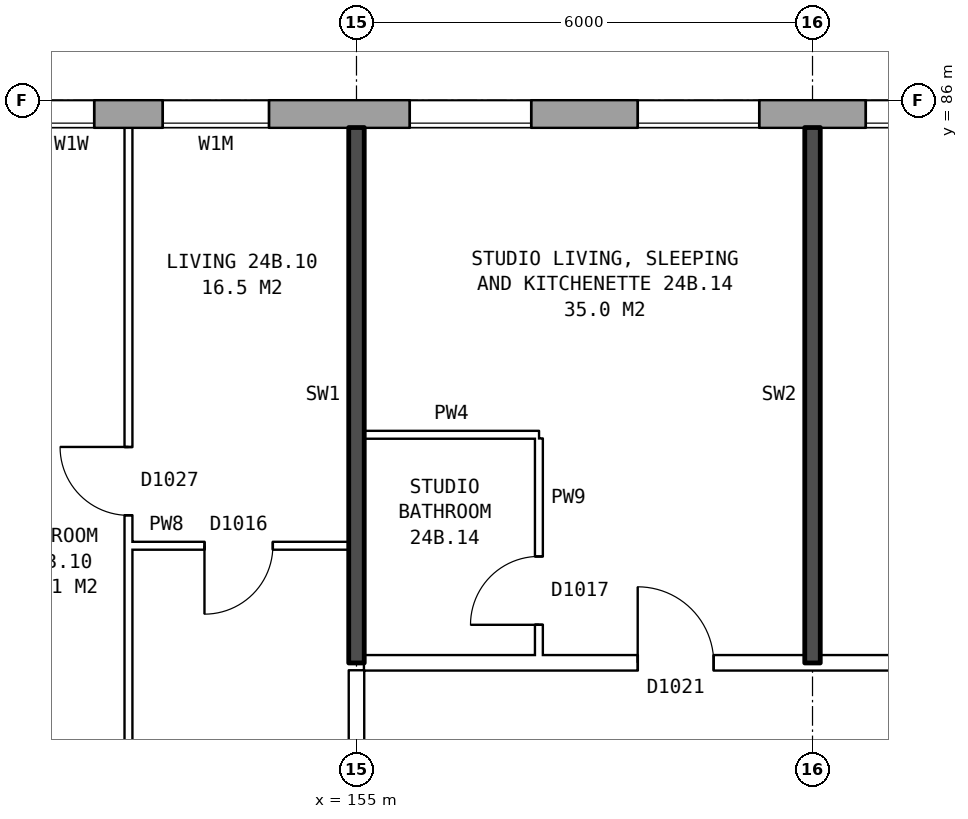
"""IFC4 building model, lengths in metres.
Left out: names, types, materials, properties, quantities, classifications, styles, units other than length and angle.
Written with IfcOpenShell. Run it as: python <this file> out.ifc"""

import sys

from ifc_helpers import new_model, si_unit, direction, frame, frame_2d, origin, place, context, subcontext, project, spatial, rectangle, extrude, element, fill, save


model = new_model("IFC4")
c1 = context("Model", 3, precision=1e-05, world=origin(), true_north=direction((0.0, 1.0)))
c2 = subcontext(c1, "Body", "Model", "MODEL_VIEW")
j1 = project(units=[si_unit("LENGTHUNIT", "METRE"), si_unit("PLANEANGLEUNIT", "RADIAN")], contexts=[c1])
p1 = place(None, origin())
s1 = spatial("IfcSite", under=j1, at=p1, CompositionType="ELEMENT")
p2 = place(p1, origin())
s2 = spatial("IfcBuilding", under=s1, at=p2, CompositionType="ELEMENT")
p3 = place(p2, frame((0.0, 0.0, 87.1)))
s3 = spatial("IfcBuildingStorey", under=s2, at=p3, CompositionType="ELEMENT", Elevation=87.1)
p4 = place(p3, frame((172.175, 85.82, 0.0), z_axis=(0.0, 0.0, 1.0), x_axis=(-1.0, 0.0, 0.0)))
e1 = element("IfcWall", 1, at=p4, inside=s3, PredefinedType="STANDARD", context=c2, shape_type="SweptSolid", body=[
    extrude(rectangle(XDim=38.101, YDim=0.36, at=frame_2d((19.05, 0.0))), origin(), (0.0, 0.0, 1.0), 2.85),
])
p5 = place(p4, frame((2.875, 0.0, 0.8)))
e2 = element("IfcOpeningElement", 2, at=p5, cuts=e1, PredefinedType="OPENING", context=c2, shape_type="SweptSolid", body=[
    extrude(rectangle(XDim=1.6, YDim=1.8, at=frame_2d((0.8, 0.9))), frame((0.0, 0.19, 0.0), z_axis=(0.0, -1.0, 0.0), x_axis=(1.0, 0.0, 0.0)), (0.0, 0.0, 1.0), 0.38),
])
p6 = place(p4, frame((5.875, 0.0, 0.8)))
e3 = element("IfcOpeningElement", 3, at=p6, cuts=e1, PredefinedType="OPENING", context=c2, shape_type="SweptSolid", body=[
    extrude(rectangle(XDim=1.6, YDim=1.8, at=frame_2d((0.8, 0.9))), frame((0.0, 0.19, 0.0), z_axis=(0.0, -1.0, 0.0), x_axis=(1.0, 0.0, 0.0)), (0.0, 0.0, 1.0), 0.38),
])
p7 = place(p4, frame((8.875, 0.0, 0.8)))
e4 = element("IfcOpeningElement", 4, at=p7, cuts=e1, PredefinedType="OPENING", context=c2, shape_type="SweptSolid", body=[
    extrude(rectangle(XDim=1.6, YDim=1.8, at=frame_2d((0.8, 0.9))), frame((0.0, 0.19, 0.0), z_axis=(0.0, -1.0, 0.0), x_axis=(1.0, 0.0, 0.0)), (0.0, 0.0, 1.0), 0.38),
])
p8 = place(p4, frame((11.875, 0.0, 0.8)))
e5 = element("IfcOpeningElement", 5, at=p8, cuts=e1, PredefinedType="OPENING", context=c2, shape_type="SweptSolid", body=[
    extrude(rectangle(XDim=1.6, YDim=1.8, at=frame_2d((0.8, 0.9))), frame((0.0, 0.19, 0.0), z_axis=(0.0, -1.0, 0.0), x_axis=(1.0, 0.0, 0.0)), (0.0, 0.0, 1.0), 0.38),
])
p9 = place(p4, frame((14.875, 0.0, 0.8)))
e6 = element("IfcOpeningElement", 6, at=p9, cuts=e1, PredefinedType="OPENING", context=c2, shape_type="SweptSolid", body=[
    extrude(rectangle(XDim=1.6, YDim=1.8, at=frame_2d((0.8, 0.9))), frame((0.0, 0.19, 0.0), z_axis=(0.0, -1.0, 0.0), x_axis=(1.0, 0.0, 0.0)), (0.0, 0.0, 1.0), 0.38),
])
p10 = place(p4, frame((18.325, 0.0, 0.15)))
e7 = element("IfcOpeningElement", 7, at=p10, cuts=e1, PredefinedType="OPENING", context=c2, shape_type="SweptSolid", body=[
    extrude(rectangle(XDim=1.4, YDim=1.2, at=frame_2d((0.7, 0.6))), frame((0.0, 0.19, 0.0), z_axis=(0.0, -1.0, 0.0), x_axis=(1.0, 0.0, 0.0)), (0.0, 0.0, 1.0), 0.38),
])
p11 = place(p4, frame((20.625, 0.0, 1.7)))
e8 = element("IfcOpeningElement", 8, at=p11, cuts=e1, PredefinedType="OPENING", context=c2, shape_type="SweptSolid", body=[
    extrude(rectangle(XDim=0.6, YDim=0.9, at=frame_2d((0.3, 0.45))), frame((0.0, 0.19, 0.0), z_axis=(0.0, -1.0, 0.0), x_axis=(1.0, 0.0, 0.0)), (0.0, 0.0, 1.0), 0.38),
])
p12 = place(p4, frame((23.875, 0.0, 0.8)))
e9 = element("IfcOpeningElement", 9, at=p12, cuts=e1, PredefinedType="OPENING", context=c2, shape_type="SweptSolid", body=[
    extrude(rectangle(XDim=1.6, YDim=1.8, at=frame_2d((0.8, 0.9))), frame((0.0, 0.19, 0.0), z_axis=(0.0, -1.0, 0.0), x_axis=(1.0, 0.0, 0.0)), (0.0, 0.0, 1.0), 0.38),
])
p13 = place(p4, frame((26.875, 0.0, 0.8)))
e10 = element("IfcOpeningElement", 10, at=p13, cuts=e1, PredefinedType="OPENING", context=c2, shape_type="SweptSolid", body=[
    extrude(rectangle(XDim=1.6, YDim=1.8, at=frame_2d((0.8, 0.9))), frame((0.0, 0.19, 0.0), z_axis=(0.0, -1.0, 0.0), x_axis=(1.0, 0.0, 0.0)), (0.0, 0.0, 1.0), 0.38),
])
p14 = place(p4, frame((29.875, 0.0, 0.8)))
e11 = element("IfcOpeningElement", 11, at=p14, cuts=e1, PredefinedType="OPENING", context=c2, shape_type="SweptSolid", body=[
    extrude(rectangle(XDim=1.6, YDim=1.8, at=frame_2d((0.8, 0.9))), frame((0.0, 0.19, 0.0), z_axis=(0.0, -1.0, 0.0), x_axis=(1.0, 0.0, 0.0)), (0.0, 0.0, 1.0), 0.38),
])
p15 = place(p4, frame((32.875, 0.0, 0.8)))
e12 = element("IfcOpeningElement", 12, at=p15, cuts=e1, PredefinedType="OPENING", context=c2, shape_type="SweptSolid", body=[
    extrude(rectangle(XDim=1.6, YDim=1.8, at=frame_2d((0.8, 0.9))), frame((0.0, 0.19, 0.0), z_axis=(0.0, -1.0, 0.0), x_axis=(1.0, 0.0, 0.0)), (0.0, 0.0, 1.0), 0.38),
])
p16 = place(p4, frame((35.875, 0.0, 0.8)))
e13 = element("IfcOpeningElement", 13, at=p16, cuts=e1, PredefinedType="OPENING", context=c2, shape_type="SweptSolid", body=[
    extrude(rectangle(XDim=1.6, YDim=1.8, at=frame_2d((0.8, 0.9))), frame((0.0, 0.19, 0.0), z_axis=(0.0, -1.0, 0.0), x_axis=(1.0, 0.0, 0.0)), (0.0, 0.0, 1.0), 0.38),
])
p17 = place(p4, frame((21.525, 0.0, 0.8)))
e14 = element("IfcOpeningElement", 14, at=p17, cuts=e1, PredefinedType="OPENING", context=c2, shape_type="SweptSolid", body=[
    extrude(rectangle(XDim=1.4, YDim=1.8, at=frame_2d((0.7, 0.9))), frame((0.0, 0.19, 0.0), z_axis=(0.0, -1.0, 0.0), x_axis=(1.0, 0.0, 0.0)), (0.0, 0.0, 1.0), 0.38),
])
p18 = place(p3, frame((155.1, 78.6, 0.0), z_axis=(0.0, 0.0, 1.0), x_axis=(1.0, 0.0, 0.0)))
e15 = element("IfcWall", 15, at=p18, inside=s3, PredefinedType="PARTITIONING", context=c2, shape_type="SweptSolid", body=[
    extrude(rectangle(XDim=19.79, YDim=0.2, at=frame_2d((9.895, 0.0))), origin(), (0.0, 0.0, 1.0), 2.85),
])
p19 = place(p18, frame((3.6, 0.0, 0.0)))
e16 = element("IfcOpeningElement", 16, at=p19, cuts=e15, PredefinedType="OPENING", context=c2, shape_type="SweptSolid", body=[
    extrude(rectangle(XDim=1.0, YDim=2.1, at=frame_2d((0.5, 1.05))), frame((0.0, 0.11, 0.0), z_axis=(0.0, -1.0, 0.0), x_axis=(1.0, 0.0, 0.0)), (0.0, 0.0, 1.0), 0.22),
])
p20 = place(p18, frame((7.4, 0.0, 0.0)))
e17 = element("IfcOpeningElement", 17, at=p20, cuts=e15, PredefinedType="OPENING", context=c2, shape_type="SweptSolid", body=[
    extrude(rectangle(XDim=1.0, YDim=2.1, at=frame_2d((0.5, 1.05))), frame((0.0, 0.11, 0.0), z_axis=(0.0, -1.0, 0.0), x_axis=(1.0, 0.0, 0.0)), (0.0, 0.0, 1.0), 0.22),
])
p21 = place(p18, frame((16.545, 0.0, 0.0)))
e18 = element("IfcOpeningElement", 18, at=p21, cuts=e15, PredefinedType="OPENING", context=c2, shape_type="SweptSolid", body=[
    extrude(rectangle(XDim=1.0, YDim=2.1, at=frame_2d((0.5, 1.05))), frame((0.0, 0.11, 0.0), z_axis=(0.0, -1.0, 0.0), x_axis=(1.0, 0.0, 0.0)), (0.0, 0.0, 1.0), 0.22),
])
p22 = place(p3, frame((152.0, 80.14, 0.0), z_axis=(0.0, 0.0, 1.0), x_axis=(1.0, 0.0, 0.0)))
e19 = element("IfcWall", 19, at=p22, inside=s3, PredefinedType="PARTITIONING", context=c2, shape_type="SweptSolid", body=[
    extrude(rectangle(XDim=2.9, YDim=0.1, at=frame_2d((1.45, 0.0))), origin(), (0.0, 0.0, 1.0), 2.85),
])
p23 = place(p22, frame((1.0, 0.0, 0.0)))
e20 = element("IfcOpeningElement", 20, at=p23, cuts=e19, PredefinedType="OPENING", context=c2, shape_type="SweptSolid", body=[
    extrude(rectangle(XDim=0.9, YDim=2.1, at=frame_2d((0.45, 1.05))), frame((0.0, 0.06, 0.0), z_axis=(0.0, -1.0, 0.0), x_axis=(1.0, 0.0, 0.0)), (0.0, 0.0, 1.0), 0.12),
])
p24 = place(p3, frame((155.1, 81.6, 0.0), z_axis=(0.0, 0.0, 1.0), x_axis=(1.0, 0.0, 0.0)))
e21 = element("IfcWall", 21, at=p24, inside=s3, PredefinedType="PARTITIONING", context=c2, shape_type="SweptSolid", body=[
    extrude(rectangle(XDim=2.3, YDim=0.1, at=frame_2d((1.15, 0.0))), origin(), (0.0, 0.0, 1.0), 2.85),
])
p25 = place(p3, frame((152.0, 71.3, 0.0), z_axis=(0.0, 0.0, 1.0), x_axis=(0.0, 1.0, 0.0)))
e22 = element("IfcWall", 22, at=p25, inside=s3, PredefinedType="PARTITIONING", context=c2, shape_type="SweptSolid", body=[
    extrude(rectangle(XDim=14.34, YDim=0.1, at=frame_2d((7.17, 0.0))), origin(), (0.0, 0.0, 1.0), 2.85),
])
p26 = place(p25, frame((9.24, 0.0, 0.0)))
e23 = element("IfcOpeningElement", 23, at=p26, cuts=e22, PredefinedType="OPENING", context=c2, shape_type="SweptSolid", body=[
    extrude(rectangle(XDim=0.9, YDim=2.1, at=frame_2d((0.45, 1.05))), frame((0.0, 0.06, 0.0), z_axis=(0.0, -1.0, 0.0), x_axis=(1.0, 0.0, 0.0)), (0.0, 0.0, 1.0), 0.12),
])
p27 = place(p25, frame((0.4, 0.0, 0.0)))
e24 = element("IfcOpeningElement", 24, at=p27, cuts=e22, PredefinedType="OPENING", context=c2, shape_type="SweptSolid", body=[
    extrude(rectangle(XDim=0.9, YDim=2.1, at=frame_2d((0.45, 1.05))), frame((0.0, 0.06, 0.0), z_axis=(0.0, -1.0, 0.0), x_axis=(1.0, 0.0, 0.0)), (0.0, 0.0, 1.0), 0.12),
])
p28 = place(p3, frame((155.0, 76.3, 0.0), z_axis=(0.0, 0.0, 1.0), x_axis=(0.0, 1.0, 0.0)))
e25 = element("IfcWall", 25, at=p28, inside=s3, PredefinedType="PARTITIONING", context=c2, shape_type="SweptSolid", body=[
    extrude(rectangle(XDim=2.2, YDim=0.2, at=frame_2d((1.1, 0.0))), origin(), (0.0, 0.0, 1.0), 2.85),
])
p29 = place(p3, frame((155.0, 78.6, 0.0), z_axis=(0.0, 0.0, 1.0), x_axis=(0.0, 1.0, 0.0)))
e26 = element("IfcWall", 26, at=p29, inside=s3, PredefinedType="SOLIDWALL", context=c2, shape_type="SweptSolid", body=[
    extrude(rectangle(XDim=7.04, YDim=0.2, at=frame_2d((3.52, 0.0))), origin(), (0.0, 0.0, 1.0), 2.85),
])
p30 = place(p3, frame((157.4, 78.7, 0.0), z_axis=(0.0, 0.0, 1.0), x_axis=(0.0, 1.0, 0.0)))
e27 = element("IfcWall", 27, at=p30, inside=s3, PredefinedType="PARTITIONING", context=c2, shape_type="SweptSolid", body=[
    extrude(rectangle(XDim=2.85, YDim=0.1, at=frame_2d((1.425, 0.0))), origin(), (0.0, 0.0, 1.0), 2.85),
])
p31 = place(p30, frame((0.4, 0.0, 0.0)))
e28 = element("IfcOpeningElement", 28, at=p31, cuts=e27, PredefinedType="OPENING", context=c2, shape_type="SweptSolid", body=[
    extrude(rectangle(XDim=0.9, YDim=2.1, at=frame_2d((0.45, 1.05))), frame((0.0, 0.06, 0.0), z_axis=(0.0, -1.0, 0.0), x_axis=(1.0, 0.0, 0.0)), (0.0, 0.0, 1.0), 0.12),
])
p32 = place(p3, frame((161.0, 78.6, 0.0), z_axis=(0.0, 0.0, 1.0), x_axis=(0.0, 1.0, 0.0)))
e29 = element("IfcWall", 29, at=p32, inside=s3, PredefinedType="SOLIDWALL", context=c2, shape_type="SweptSolid", body=[
    extrude(rectangle(XDim=7.04, YDim=0.2, at=frame_2d((3.52, 0.0))), origin(), (0.0, 0.0, 1.0), 2.85),
])
p33 = place(p7, origin())
e30 = element("IfcWindow", 30, at=p33, inside=s3, PartitioningType="SINGLE_PANEL", PredefinedType="WINDOW", context=c2, shape_type="SweptSolid", body=[
    extrude(rectangle(XDim=1.6, YDim=1.8, at=frame_2d((0.8, 0.9))), frame((0.0, 0.15, 0.0), z_axis=(0.0, -1.0, 0.0), x_axis=(1.0, 0.0, 0.0)), (0.0, 0.0, 1.0), 0.06),
])
fill(e4, e30)
p34 = place(p8, origin())
e31 = element("IfcWindow", 31, at=p34, inside=s3, PartitioningType="SINGLE_PANEL", PredefinedType="WINDOW", context=c2, shape_type="SweptSolid", body=[
    extrude(rectangle(XDim=1.6, YDim=1.8, at=frame_2d((0.8, 0.9))), frame((0.0, 0.15, 0.0), z_axis=(0.0, -1.0, 0.0), x_axis=(1.0, 0.0, 0.0)), (0.0, 0.0, 1.0), 0.06),
])
fill(e5, e31)
p35 = place(p9, origin())
e32 = element("IfcWindow", 32, at=p35, inside=s3, PartitioningType="SINGLE_PANEL", PredefinedType="WINDOW", context=c2, shape_type="SweptSolid", body=[
    extrude(rectangle(XDim=1.6, YDim=1.8, at=frame_2d((0.8, 0.9))), frame((0.0, 0.15, 0.0), z_axis=(0.0, -1.0, 0.0), x_axis=(1.0, 0.0, 0.0)), (0.0, 0.0, 1.0), 0.06),
])
fill(e6, e32)
p36 = place(p10, origin())
e33 = element("IfcWindow", 33, at=p36, inside=s3, PartitioningType="SINGLE_PANEL", PredefinedType="WINDOW", context=c2, shape_type="SweptSolid", body=[
    extrude(rectangle(XDim=1.4, YDim=1.2, at=frame_2d((0.7, 0.6))), frame((0.0, 0.15, 0.0), z_axis=(0.0, -1.0, 0.0), x_axis=(1.0, 0.0, 0.0)), (0.0, 0.0, 1.0), 0.06),
])
fill(e7, e33)
p37 = place(p11, origin())
e34 = element("IfcWindow", 34, at=p37, inside=s3, PartitioningType="SINGLE_PANEL", PredefinedType="WINDOW", context=c2, shape_type="SweptSolid", body=[
    extrude(rectangle(XDim=0.6, YDim=0.9, at=frame_2d((0.3, 0.45))), frame((0.0, 0.15, 0.0), z_axis=(0.0, -1.0, 0.0), x_axis=(1.0, 0.0, 0.0)), (0.0, 0.0, 1.0), 0.06),
])
fill(e8, e34)
p38 = place(p26, origin())
e35 = element("IfcDoor", 35, at=p38, inside=s3, OperationType="SINGLE_SWING_RIGHT", PredefinedType="DOOR", context=c2, shape_type="SweptSolid", body=[
    extrude(rectangle(XDim=0.9, YDim=2.1, at=frame_2d((0.45, 1.05))), frame((0.0, 0.025, 0.0), z_axis=(0.0, -1.0, 0.0), x_axis=(1.0, 0.0, 0.0)), (0.0, 0.0, 1.0), 0.05),
])
fill(e23, e35)
p39 = place(p23, frame((0.9, 0.0, 0.0), z_axis=(0.0, 0.0, 1.0), x_axis=(-1.0, 0.0, 0.0)))
e36 = element("IfcDoor", 36, at=p39, inside=s3, OperationType="SINGLE_SWING_RIGHT", PredefinedType="DOOR", context=c2, shape_type="SweptSolid", body=[
    extrude(rectangle(XDim=0.9, YDim=2.1, at=frame_2d((0.45, 1.05))), frame((0.0, 0.025, 0.0), z_axis=(0.0, -1.0, 0.0), x_axis=(1.0, 0.0, 0.0)), (0.0, 0.0, 1.0), 0.05),
])
fill(e20, e36)
p40 = place(p19, origin())
e37 = element("IfcDoor", 37, at=p40, inside=s3, OperationType="SINGLE_SWING_LEFT", PredefinedType="DOOR", context=c2, shape_type="SweptSolid", body=[
    extrude(rectangle(XDim=1.0, YDim=2.1, at=frame_2d((0.5, 1.05))), frame((0.0, 0.025, 0.0), z_axis=(0.0, -1.0, 0.0), x_axis=(1.0, 0.0, 0.0)), (0.0, 0.0, 1.0), 0.05),
])
fill(e16, e37)
p41 = place(p31, origin())
e38 = element("IfcDoor", 38, at=p41, inside=s3, OperationType="SINGLE_SWING_LEFT", PredefinedType="DOOR", context=c2, shape_type="SweptSolid", body=[
    extrude(rectangle(XDim=0.9, YDim=2.1, at=frame_2d((0.45, 1.05))), frame((0.0, 0.025, 0.0), z_axis=(0.0, -1.0, 0.0), x_axis=(1.0, 0.0, 0.0)), (0.0, 0.0, 1.0), 0.05),
])
fill(e28, e38)
save(model, sys.argv[1])
